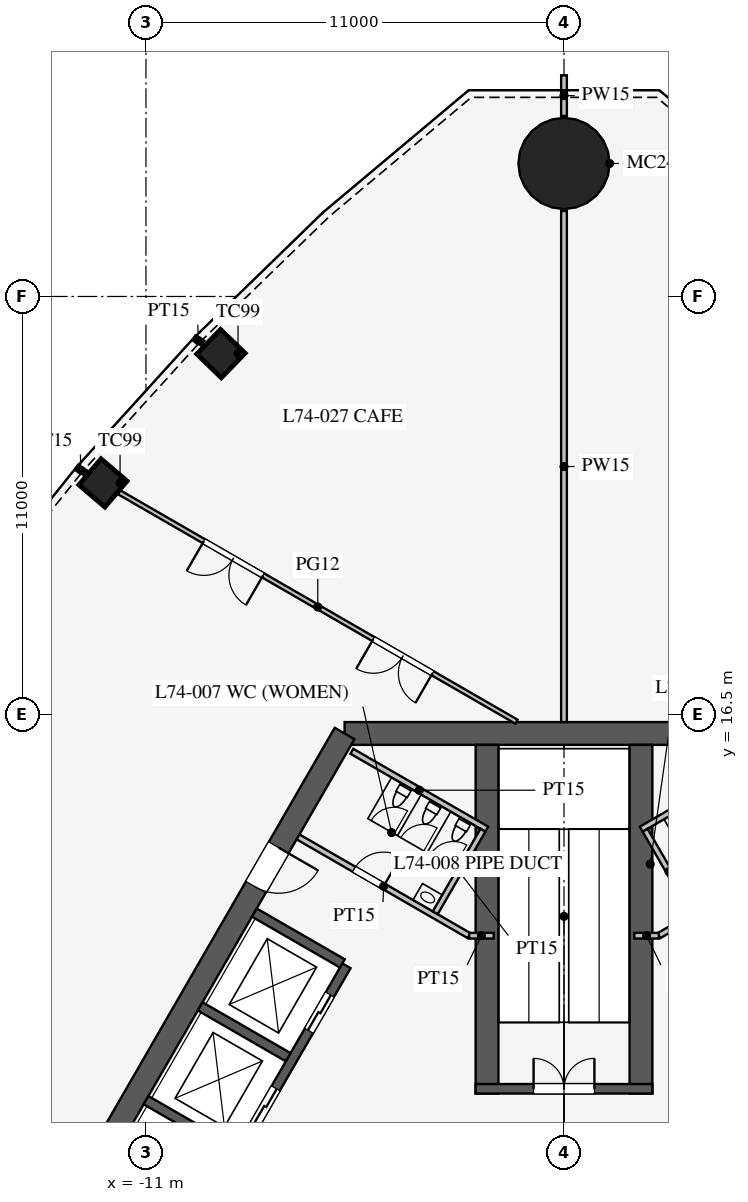
"""IFC4 building model, lengths in metres.
Left out: names, types, materials, properties, quantities, classifications, styles, units other than length and angle.
Written with IfcOpenShell. Run it as: python <this file> out.ifc"""

import sys

from ifc_helpers import new_model, si_unit, direction, frame, frame_2d, origin, origin_2d, place, context, subcontext, project, spatial, rectangle, circle, extrude, element, fill, save


model = new_model("IFC4")
c1 = context("Model", 3, precision=1e-05, world=origin(), true_north=direction((0.0, 1.0)))
c2 = subcontext(c1, "Body", "Model", "MODEL_VIEW")
j1 = project(units=[si_unit("LENGTHUNIT", "METRE"), si_unit("PLANEANGLEUNIT", "RADIAN")], contexts=[c1])
p1 = place(None, origin())
s1 = spatial("IfcSite", under=j1, at=p1, CompositionType="ELEMENT")
p2 = place(p1, origin())
s2 = spatial("IfcBuilding", under=s1, at=p2, CompositionType="ELEMENT")
p3 = place(p2, frame((0.0, 0.0, 322.5)))
s3 = spatial("IfcBuildingStorey", under=s2, at=p3, CompositionType="ELEMENT", Elevation=322.5)
for number, where, z_axis, x_axis in (
    (1, (-9.027, 25.997, 0.0), (0.0, 0.0, 1.0), (-0.695, -0.719, 0.0)),
    (2, (-12.132, 22.593, 0.0), (0.0, 0.0, 1.0), (-0.649, -0.761, 0.0)),
):
    element("IfcColumn", number, at=place(p3, frame(where, z_axis=z_axis, x_axis=x_axis)), inside=s3, PredefinedType="COLUMN", context=c2, shape_type="SweptSolid", body=[
        extrude(rectangle(XDim=0.9, YDim=0.9, at=origin_2d()), origin(), (0.0, 0.0, 1.0), 6.0),
    ])
p4 = place(p3, frame((0.0, 31.0, 0.0), z_axis=(0.0, 0.0, 1.0), x_axis=(1.0, 0.0, 0.0)))
e3 = element("IfcColumn", 3, at=p4, inside=s3, PredefinedType="COLUMN", context=c2, shape_type="SweptSolid", body=[
    extrude(circle(Radius=1.2, at=origin_2d()), origin(), (0.0, 0.0, 1.0), 6.0),
])
p5 = place(p3, frame((5.773, 16.0, 0.0), z_axis=(0.0, 0.0, 1.0), x_axis=(-1.0, 0.0, 0.0)))
e4 = element("IfcWall", 4, at=p5, inside=s3, PredefinedType="SHEAR", context=c2, shape_type="SweptSolid", body=[
    extrude(rectangle(XDim=11.547, YDim=0.6, at=frame_2d((5.773, 0.0))), origin(), (0.0, 0.0, 1.0), 6.0),
])
p6 = place(p3, frame((-5.773, 16.0, 0.0), z_axis=(0.0, 0.0, 1.0), x_axis=(-0.500002442456, -0.866023993627, 0.0)))
e5 = element("IfcWall", 5, at=p6, inside=s3, PredefinedType="SHEAR", context=c2, shape_type="SweptSolid", body=[
    extrude(rectangle(XDim=21.939, YDim=0.6, at=frame_2d((10.97, 0.0))), origin(), (0.0, 0.0, 1.0), 6.0),
])
p7 = place(p6, frame((17.27, 0.0, 0.0)))
e6 = element("IfcOpeningElement", 6, at=p7, cuts=e5, PredefinedType="OPENING", context=c2, shape_type="SweptSolid", body=[
    extrude(rectangle(XDim=1.2, YDim=2.1, at=frame_2d((0.6, 1.05))), frame((0.0, 0.31, 0.0), z_axis=(0.0, -1.0, 0.0), x_axis=(1.0, 0.0, 0.0)), (0.0, 0.0, 1.0), 0.62),
])
p8 = place(p6, frame((3.47, 0.0, 0.0)))
e7 = element("IfcOpeningElement", 7, at=p8, cuts=e5, PredefinedType="OPENING", context=c2, shape_type="SweptSolid", body=[
    extrude(rectangle(XDim=1.2, YDim=2.1, at=frame_2d((0.6, 1.05))), frame((0.0, 0.31, 0.0), z_axis=(0.0, -1.0, 0.0), x_axis=(1.0, 0.0, 0.0)), (0.0, 0.0, 1.0), 0.62),
])
p9 = place(p3, frame((-5.724, 9.886, 0.0), z_axis=(0.0, 0.0, 1.0), x_axis=(-0.500001763848, -0.866024385424, 0.0)))
e8 = element("IfcWall", 8, at=p9, inside=s3, PredefinedType="SHEAR", context=c2, shape_type="SweptSolid", body=[
    extrude(rectangle(XDim=11.4, YDim=0.25, at=frame_2d((5.7, 0.0))), origin(), (0.0, 0.0, 1.0), 6.0),
])
p10 = place(p9, frame((0.875, 0.0, 0.0)))
e9 = element("IfcOpeningElement", 9, at=p10, cuts=e8, PredefinedType="OPENING", context=c2, shape_type="SweptSolid", body=[
    extrude(rectangle(XDim=1.1, YDim=2.2, at=frame_2d((0.55, 1.1))), frame((0.0, 0.135, 0.0), z_axis=(0.0, -1.0, 0.0), x_axis=(1.0, 0.0, 0.0)), (0.0, 0.0, 1.0), 0.27),
])
p11 = place(p9, frame((3.725, 0.0, 0.0)))
e10 = element("IfcOpeningElement", 10, at=p11, cuts=e8, PredefinedType="OPENING", context=c2, shape_type="SweptSolid", body=[
    extrude(rectangle(XDim=1.1, YDim=2.2, at=frame_2d((0.55, 1.1))), frame((0.0, 0.135, 0.0), z_axis=(0.0, -1.0, 0.0), x_axis=(1.0, 0.0, 0.0)), (0.0, 0.0, 1.0), 0.27),
])
p12 = place(p9, frame((6.525, 0.0, 0.0)))
e11 = element("IfcOpeningElement", 11, at=p12, cuts=e8, PredefinedType="OPENING", context=c2, shape_type="SweptSolid", body=[
    extrude(rectangle(XDim=1.2, YDim=2.2, at=frame_2d((0.6, 1.1))), frame((0.0, 0.135, 0.0), z_axis=(0.0, -1.0, 0.0), x_axis=(1.0, 0.0, 0.0)), (0.0, 0.0, 1.0), 0.27),
])
p13 = place(p9, frame((9.375, 0.0, 0.0)))
e12 = element("IfcOpeningElement", 12, at=p13, cuts=e8, PredefinedType="OPENING", context=c2, shape_type="SweptSolid", body=[
    extrude(rectangle(XDim=1.2, YDim=2.2, at=frame_2d((0.6, 1.1))), frame((0.0, 0.135, 0.0), z_axis=(0.0, -1.0, 0.0), x_axis=(1.0, 0.0, 0.0)), (0.0, 0.0, 1.0), 0.27),
])
for number, where, z_axis, x_axis in (
    (13, (-5.832, 9.949, 0.0), (0.0, 0.0, 1.0), (-0.866, 0.5, 0.0)),
    (14, (-7.257, 7.481, 0.0), (0.0, 0.0, 1.0), (-0.866, 0.5, 0.0)),
    (15, (-8.682, 5.012, 0.0), (0.0, 0.0, 1.0), (-0.866, 0.5, 0.0)),
):
    element("IfcWall", number, at=place(p3, frame(where, z_axis=z_axis, x_axis=x_axis)), inside=s3, PredefinedType="SHEAR", context=c2, shape_type="SweptSolid", body=[
        extrude(rectangle(XDim=2.675, YDim=0.25, at=frame_2d((1.337, 0.0))), origin(), (0.0, 0.0, 1.0), 6.0),
    ])
for number, where, z_axis, x_axis in (
    (16, (2.025, 6.525, 0.0), (0.0, 0.0, 1.0), (0.0, 1.0, 0.0)),
    (17, (-2.025, 6.525, 0.0), (0.0, 0.0, 1.0), (0.0, 1.0, 0.0)),
):
    element("IfcWall", number, at=place(p3, frame(where, z_axis=z_axis, x_axis=x_axis)), inside=s3, PredefinedType="SHEAR", context=c2, shape_type="SweptSolid", body=[
        extrude(rectangle(XDim=9.175, YDim=0.6, at=frame_2d((4.587, 0.0))), origin(), (0.0, 0.0, 1.0), 6.0),
    ])
p14 = place(p3, frame((2.325, 6.65, 0.0), z_axis=(0.0, 0.0, 1.0), x_axis=(-1.0, 0.0, 0.0)))
e18 = element("IfcWall", 18, at=p14, inside=s3, PredefinedType="SHEAR", context=c2, shape_type="SweptSolid", body=[
    extrude(rectangle(XDim=4.65, YDim=0.25, at=frame_2d((2.325, 0.0))), origin(), (0.0, 0.0, 1.0), 6.0),
])
p15 = place(p14, frame((1.525, 0.0, 0.0)))
e19 = element("IfcOpeningElement", 19, at=p15, cuts=e18, PredefinedType="OPENING", context=c2, shape_type="SweptSolid", body=[
    extrude(rectangle(XDim=1.6, YDim=2.1, at=frame_2d((0.8, 1.05))), frame((0.0, 0.135, 0.0), z_axis=(0.0, -1.0, 0.0), x_axis=(1.0, 0.0, 0.0)), (0.0, 0.0, 1.0), 0.27),
])
p16 = place(p3, frame((2.495, 10.678, 0.0), z_axis=(0.0, 0.0, 1.0), x_axis=(0.866021400173, 0.500006934395, 0.0)))
e20 = element("IfcWall", 20, at=p16, inside=s3, PredefinedType="PARTITIONING", context=c2, shape_type="SweptSolid", body=[
    extrude(rectangle(XDim=5.2, YDim=0.15, at=frame_2d((2.6, 0.0))), origin(), (0.0, 0.0, 1.0), 5.75),
])
p17 = place(p16, frame((1.3, 0.0, 0.0)))
e21 = element("IfcOpeningElement", 21, at=p17, cuts=e20, PredefinedType="OPENING", context=c2, shape_type="SweptSolid", body=[
    extrude(rectangle(XDim=0.9, YDim=2.1, at=frame_2d((0.45, 1.05))), frame((0.0, 0.085, 0.0), z_axis=(0.0, -1.0, 0.0), x_axis=(1.0, 0.0, 0.0)), (0.0, 0.0, 1.0), 0.17),
])
p18 = place(p3, frame((-2.495, 10.678, 0.0), z_axis=(0.0, 0.0, 1.0), x_axis=(-0.866021400173, 0.500006934395, 0.0)))
e22 = element("IfcWall", 22, at=p18, inside=s3, PredefinedType="PARTITIONING", context=c2, shape_type="SweptSolid", body=[
    extrude(rectangle(XDim=5.2, YDim=0.15, at=frame_2d((2.6, 0.0))), origin(), (0.0, 0.0, 1.0), 5.75),
])
p19 = place(p18, frame((2.6, 0.0, 0.0)))
e23 = element("IfcOpeningElement", 23, at=p19, cuts=e22, PredefinedType="OPENING", context=c2, shape_type="SweptSolid", body=[
    extrude(rectangle(XDim=0.9, YDim=2.1, at=frame_2d((0.45, 1.05))), frame((0.0, 0.085, 0.0), z_axis=(0.0, -1.0, 0.0), x_axis=(1.0, 0.0, 0.0)), (0.0, 0.0, 1.0), 0.17),
])
for number, where, z_axis, x_axis in (
    (24, (2.495, 10.678, 0.0), (0.0, 0.0, 1.0), (-1.0, 0.0, 0.0)),
    (25, (-2.495, 10.678, 0.0), (0.0, 0.0, 1.0), (1.0, 0.0, 0.0)),
):
    element("IfcWall", number, at=place(p3, frame(where, z_axis=z_axis, x_axis=x_axis)), inside=s3, PredefinedType="PARTITIONING", context=c2, shape_type="SweptSolid", body=[
        extrude(rectangle(XDim=0.645, YDim=0.15, at=frame_2d((0.323, 0.0))), origin(), (0.0, 0.0, 1.0), 5.75),
    ])
p20 = place(p3, frame((2.031, 13.482, 0.0), z_axis=(0.0, 0.0, 1.0), x_axis=(0.866050731258, 0.499956128963, 0.0)))
e26 = element("IfcWall", 26, at=p20, inside=s3, PredefinedType="PARTITIONING", context=c2, shape_type="SweptSolid", body=[
    extrude(rectangle(XDim=4.1, YDim=0.15, at=frame_2d((2.05, 0.0))), origin(), (0.0, 0.0, 1.0), 5.75),
])
p21 = place(p3, frame((3.389, 11.281, 0.0), z_axis=(0.0, 0.0, 1.0), x_axis=(-0.499989096993, 0.866031698547, 0.0)))
e27 = element("IfcWall", 27, at=p21, inside=s3, PredefinedType="PARTITIONING", context=c2, shape_type="SweptSolid", body=[
    extrude(rectangle(XDim=2.51, YDim=0.15, at=frame_2d((1.255, 0.0))), origin(), (0.0, 0.0, 1.0), 5.75),
])
p22 = place(p3, frame((-2.031, 13.482, 0.0), z_axis=(0.0, 0.0, 1.0), x_axis=(-0.866050731258, 0.499956128963, 0.0)))
e28 = element("IfcWall", 28, at=p22, inside=s3, PredefinedType="PARTITIONING", context=c2, shape_type="SweptSolid", body=[
    extrude(rectangle(XDim=4.1, YDim=0.15, at=frame_2d((2.05, 0.0))), origin(), (0.0, 0.0, 1.0), 5.75),
])
p23 = place(p3, frame((-3.389, 11.281, 0.0), z_axis=(0.0, 0.0, 1.0), x_axis=(0.499989096993, 0.866031698547, 0.0)))
e29 = element("IfcWall", 29, at=p23, inside=s3, PredefinedType="PARTITIONING", context=c2, shape_type="SweptSolid", body=[
    extrude(rectangle(XDim=2.51, YDim=0.15, at=frame_2d((1.255, 0.0))), origin(), (0.0, 0.0, 1.0), 5.75),
])
p24 = place(p3, frame((0.0, 16.3, 0.0), z_axis=(0.0, 0.0, 1.0), x_axis=(0.0, 1.0, 0.0)))
e30 = element("IfcWall", 30, at=p24, inside=s3, PredefinedType="PARTITIONING", context=c2, shape_type="SweptSolid", body=[
    extrude(rectangle(XDim=13.45, YDim=0.15, at=frame_2d((6.725, 0.0))), origin(), (0.0, 0.0, 1.0), 3.75),
])
p25 = place(p3, frame((0.0, 32.25, 0.0), z_axis=(0.0, 0.0, 1.0), x_axis=(0.0, 1.0, 0.0)))
e31 = element("IfcWall", 31, at=p25, inside=s3, PredefinedType="PARTITIONING", context=c2, shape_type="SweptSolid", body=[
    extrude(rectangle(XDim=1.07, YDim=0.15, at=frame_2d((0.535, 0.0))), origin(), (0.0, 0.0, 1.0), 3.75),
])
p26 = place(p3, frame((-12.589, 22.857, 0.0), z_axis=(0.0, 0.0, 1.0), x_axis=(-0.865982457891, 0.500074377092, 0.0)))
e32 = element("IfcWall", 32, at=p26, inside=s3, PredefinedType="PARTITIONING", context=c2, shape_type="SweptSolid", body=[
    extrude(rectangle(XDim=0.28, YDim=0.15, at=frame_2d((0.14, 0.0))), origin(), (0.0, 0.0, 1.0), 4.5),
])
p27 = place(p3, frame((-9.504, 26.271, 0.0), z_axis=(0.0, 0.0, 1.0), x_axis=(-0.866004557827, 0.500036104519, 0.0)))
e33 = element("IfcWall", 33, at=p27, inside=s3, PredefinedType="PARTITIONING", context=c2, shape_type="SweptSolid", body=[
    extrude(rectangle(XDim=0.27, YDim=0.15, at=frame_2d((0.135, 0.0))), origin(), (0.0, 0.0, 1.0), 4.5),
])
p28 = place(p3, frame((-1.25, 16.31, 0.0), z_axis=(0.0, 0.0, 1.0), x_axis=(-0.866032758387, 0.499987261238, 0.0)))
e34 = element("IfcWall", 34, at=p28, inside=s3, PredefinedType="PARTITIONING", context=c2, shape_type="SweptSolid", body=[
    extrude(rectangle(XDim=12.077, YDim=0.12, at=frame_2d((6.039, 0.0))), origin(), (0.0, 0.0, 1.0), 4.5),
])
p29 = place(p28, frame((2.55, 0.0, 0.0)))
e35 = element("IfcOpeningElement", 35, at=p29, cuts=e34, PredefinedType="OPENING", context=c2, shape_type="SweptSolid", body=[
    extrude(rectangle(XDim=1.8, YDim=2.1, at=frame_2d((0.9, 1.05))), frame((0.0, 0.07, 0.0), z_axis=(0.0, -1.0, 0.0), x_axis=(1.0, 0.0, 0.0)), (0.0, 0.0, 1.0), 0.14),
])
p30 = place(p28, frame((7.7, 0.0, 0.0)))
e36 = element("IfcOpeningElement", 36, at=p30, cuts=e34, PredefinedType="OPENING", context=c2, shape_type="SweptSolid", body=[
    extrude(rectangle(XDim=1.8, YDim=2.1, at=frame_2d((0.9, 1.05))), frame((0.0, 0.07, 0.0), z_axis=(0.0, -1.0, 0.0), x_axis=(1.0, 0.0, 0.0)), (0.0, 0.0, 1.0), 0.14),
])
p31 = place(p19, frame((0.9, 0.0, 0.0), z_axis=(0.0, 0.0, 1.0), x_axis=(-1.0, 0.0, 0.0)))
e37 = element("IfcDoor", 37, at=p31, inside=s3, OperationType="SINGLE_SWING_RIGHT", PredefinedType="DOOR", context=c2, shape_type="SweptSolid", body=[
    extrude(rectangle(XDim=0.9, YDim=2.1, at=frame_2d((0.45, 1.05))), frame((0.0, 0.025, 0.0), z_axis=(0.0, -1.0, 0.0), x_axis=(1.0, 0.0, 0.0)), (0.0, 0.0, 1.0), 0.05),
])
fill(e23, e37)
p32 = place(p15, frame((1.6, 0.0, 0.0), z_axis=(0.0, 0.0, 1.0), x_axis=(-1.0, 0.0, 0.0)))
e38 = element("IfcDoor", 38, at=p32, inside=s3, OperationType="DOUBLE_DOOR_SINGLE_SWING", PredefinedType="DOOR", context=c2, shape_type="SweptSolid", body=[
    extrude(rectangle(XDim=1.6, YDim=2.1, at=frame_2d((0.8, 1.05))), frame((0.0, 0.025, 0.0), z_axis=(0.0, -1.0, 0.0), x_axis=(1.0, 0.0, 0.0)), (0.0, 0.0, 1.0), 0.05),
])
fill(e19, e38)
p33 = place(p8, origin())
e39 = element("IfcDoor", 39, at=p33, inside=s3, OperationType="SINGLE_SWING_LEFT", PredefinedType="DOOR", context=c2, shape_type="SweptSolid", body=[
    extrude(rectangle(XDim=1.2, YDim=2.1, at=frame_2d((0.6, 1.05))), frame((0.0, 0.025, 0.0), z_axis=(0.0, -1.0, 0.0), x_axis=(1.0, 0.0, 0.0)), (0.0, 0.0, 1.0), 0.05),
])
fill(e7, e39)
p34 = place(p29, origin())
e40 = element("IfcDoor", 40, at=p34, inside=s3, OperationType="DOUBLE_DOOR_SINGLE_SWING", PredefinedType="DOOR", context=c2, shape_type="SweptSolid", body=[
    extrude(rectangle(XDim=1.8, YDim=2.1, at=frame_2d((0.9, 1.05))), frame((0.0, 0.025, 0.0), z_axis=(0.0, -1.0, 0.0), x_axis=(1.0, 0.0, 0.0)), (0.0, 0.0, 1.0), 0.05),
])
fill(e35, e40)
p35 = place(p30, origin())
e41 = element("IfcDoor", 41, at=p35, inside=s3, OperationType="DOUBLE_DOOR_SINGLE_SWING", PredefinedType="DOOR", context=c2, shape_type="SweptSolid", body=[
    extrude(rectangle(XDim=1.8, YDim=2.1, at=frame_2d((0.9, 1.05))), frame((0.0, 0.025, 0.0), z_axis=(0.0, -1.0, 0.0), x_axis=(1.0, 0.0, 0.0)), (0.0, 0.0, 1.0), 0.05),
])
fill(e36, e41)
p36 = place(p10, origin())
e42 = element("IfcDoor", 42, at=p36, inside=s3, OperationType="DOUBLE_DOOR_SLIDING", PredefinedType="DOOR", context=c2, shape_type="SweptSolid", body=[
    extrude(rectangle(XDim=1.1, YDim=2.2, at=frame_2d((0.55, 1.1))), frame((0.0, 0.025, 0.0), z_axis=(0.0, -1.0, 0.0), x_axis=(1.0, 0.0, 0.0)), (0.0, 0.0, 1.0), 0.05),
])
fill(e9, e42)
p37 = place(p11, origin())
e43 = element("IfcDoor", 43, at=p37, inside=s3, OperationType="DOUBLE_DOOR_SLIDING", PredefinedType="DOOR", context=c2, shape_type="SweptSolid", body=[
    extrude(rectangle(XDim=1.1, YDim=2.2, at=frame_2d((0.55, 1.1))), frame((0.0, 0.025, 0.0), z_axis=(0.0, -1.0, 0.0), x_axis=(1.0, 0.0, 0.0)), (0.0, 0.0, 1.0), 0.05),
])
fill(e10, e43)
save(model, sys.argv[1])
